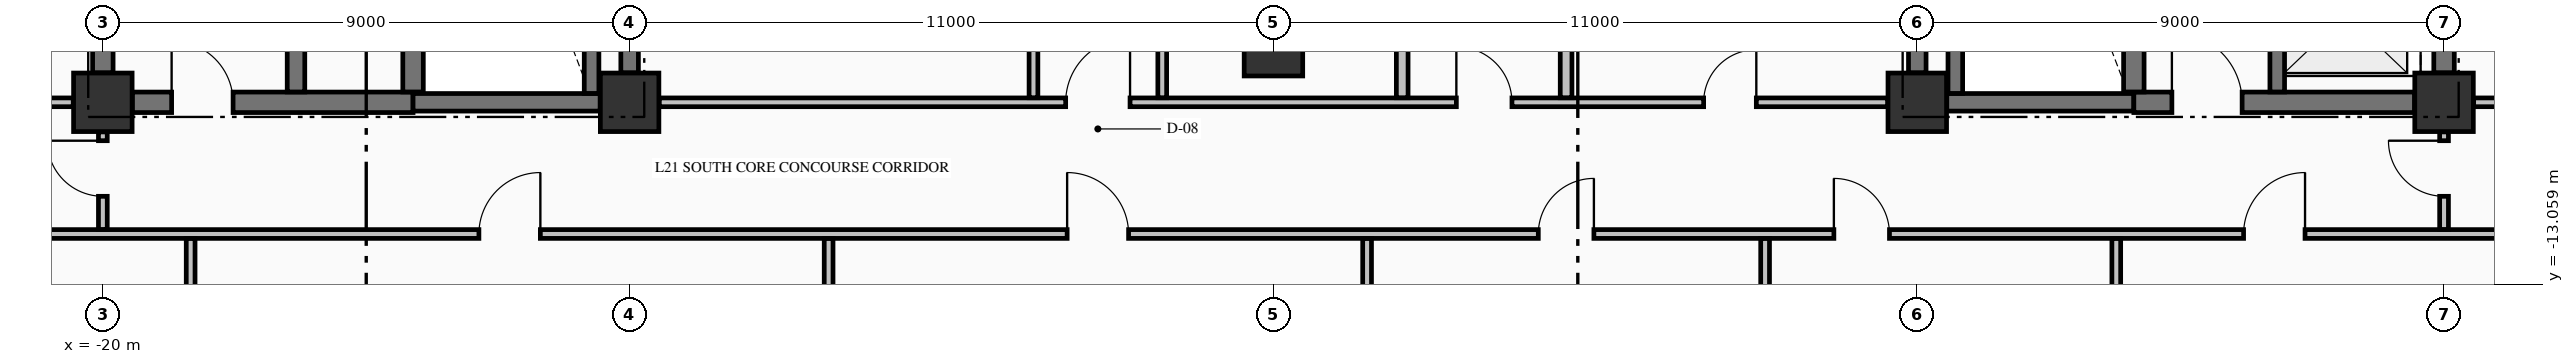
"""IFC4 building model, lengths in metres.
Left out: names, types, materials, properties, quantities, classifications, styles, units other than length and angle.
Written with IfcOpenShell. Run it as: python <this file> out.ifc"""

import sys

from ifc_helpers import new_model, si_unit, direction, frame, frame_2d, origin, origin_2d, place, context, subcontext, project, spatial, rectangle, extrude, element, fill, save


model = new_model("IFC4")
c1 = context("Model", 3, precision=1e-05, world=origin(), true_north=direction((0.0, 1.0)))
c2 = subcontext(c1, "Body", "Model", "MODEL_VIEW")
j1 = project(units=[si_unit("LENGTHUNIT", "METRE"), si_unit("PLANEANGLEUNIT", "RADIAN")], contexts=[c1])
p1 = place(None, origin())
s1 = spatial("IfcSite", under=j1, at=p1, CompositionType="ELEMENT")
p2 = place(p1, origin())
s2 = spatial("IfcBuilding", under=s1, at=p2, CompositionType="ELEMENT")
p3 = place(p2, frame((0.0, 0.0, 86.94)))
s3 = spatial("IfcBuildingStorey", under=s2, at=p3, CompositionType="ELEMENT", Elevation=86.94)
for number, where, z_axis, x_axis in (
    (1, (-20.0, -9.95, -0.425), (0.0, 0.0, 1.0), (1.0, 0.0, 0.0)),
    (2, (-11.0, -9.95, -0.425), (0.0, 0.0, 1.0), (1.0, 0.0, 0.0)),
    (3, (11.0, -9.95, -0.425), (0.0, 0.0, 1.0), (1.0, 0.0, 0.0)),
    (4, (20.0, -9.95, -0.425), (0.0, 0.0, 1.0), (1.0, 0.0, 0.0)),
    (5, (0.0, -9.0, -0.425), (0.0, 0.0, 1.0), (1.0, 0.0, 0.0)),
):
    element("IfcColumn", number, at=place(p3, frame(where, z_axis=z_axis, x_axis=x_axis)), inside=s3, PredefinedType="COLUMN", context=c2, shape_type="SweptSolid", body=[
        extrude(rectangle(XDim=1.0, YDim=1.0, at=origin_2d()), origin(), (0.0, 0.0, 1.0), 4.595),
    ])
p4 = place(p3, frame((-19.496, -9.95, 0.0), z_axis=(0.0, 0.0, 1.0), x_axis=(1.0, 0.0, 0.0)))
e6 = element("IfcWall", 6, at=p4, inside=s3, PredefinedType="SHEAR", context=c2, shape_type="SweptSolid", body=[
    extrude(rectangle(XDim=4.796, YDim=0.35, at=frame_2d((2.398, 0.0))), origin(), (0.0, 0.0, 1.0), 4.17),
])
p5 = place(p4, frame((0.671, 0.0, 0.0)))
e7 = element("IfcOpeningElement", 7, at=p5, cuts=e6, PredefinedType="OPENING", context=c2, shape_type="SweptSolid", body=[
    extrude(rectangle(XDim=1.05, YDim=2.15, at=frame_2d((0.525, 1.075))), frame((0.0, 0.185, 0.0), z_axis=(0.0, -1.0, 0.0), x_axis=(1.0, 0.0, 0.0)), (0.0, 0.0, 1.0), 0.37),
])
for number, where, z_axis, x_axis in (
    (8, (-14.7, -9.95, 0.0), (0.0, 0.0, 1.0), (1.0, 0.0, 0.0)),
    (9, (11.504, -9.95, 0.0), (0.0, 0.0, 1.0), (1.0, 0.0, 0.0)),
):
    element("IfcWall", number, at=place(p3, frame(where, z_axis=z_axis, x_axis=x_axis)), inside=s3, PredefinedType="SHEAR", context=c2, shape_type="SweptSolid", body=[
        extrude(rectangle(XDim=3.196, YDim=0.3, at=frame_2d((1.598, 0.0))), origin(), (0.0, 0.0, 1.0), 4.17),
    ])
p6 = place(p3, frame((14.7, -9.95, 0.0), z_axis=(0.0, 0.0, 1.0), x_axis=(1.0, 0.0, 0.0)))
e10 = element("IfcWall", 10, at=p6, inside=s3, PredefinedType="SHEAR", context=c2, shape_type="SweptSolid", body=[
    extrude(rectangle(XDim=4.796, YDim=0.35, at=frame_2d((2.398, 0.0))), origin(), (0.0, 0.0, 1.0), 4.17),
])
p7 = place(p6, frame((0.65, 0.0, 0.0)))
e11 = element("IfcOpeningElement", 11, at=p7, cuts=e10, PredefinedType="OPENING", context=c2, shape_type="SweptSolid", body=[
    extrude(rectangle(XDim=1.2, YDim=2.15, at=frame_2d((0.6, 1.075))), frame((0.0, 0.185, 0.0), z_axis=(0.0, -1.0, 0.0), x_axis=(1.0, 0.0, 0.0)), (0.0, 0.0, 1.0), 0.37),
])
p8 = place(p3, frame((-22.835, -12.2, 0.0), z_axis=(0.0, 0.0, 1.0), x_axis=(1.0, 0.0, 0.0)))
e12 = element("IfcWall", 12, at=p8, inside=s3, PredefinedType="PARTITIONING", context=c2, shape_type="SweptSolid", body=[
    extrude(rectangle(XDim=50.67, YDim=0.15, at=frame_2d((25.335, 0.0))), origin(), (0.0, 0.0, 1.0), 4.17),
])
p9 = place(p8, frame((9.26, 0.0, 0.0)))
e13 = element("IfcOpeningElement", 13, at=p9, cuts=e12, PredefinedType="OPENING", context=c2, shape_type="SweptSolid", body=[
    extrude(rectangle(XDim=1.05, YDim=2.15, at=frame_2d((0.525, 1.075))), frame((0.0, 0.085, 0.0), z_axis=(0.0, -1.0, 0.0), x_axis=(1.0, 0.0, 0.0)), (0.0, 0.0, 1.0), 0.17),
])
p10 = place(p8, frame((19.31, 0.0, 0.0)))
e14 = element("IfcOpeningElement", 14, at=p10, cuts=e12, PredefinedType="OPENING", context=c2, shape_type="SweptSolid", body=[
    extrude(rectangle(XDim=1.05, YDim=2.15, at=frame_2d((0.525, 1.075))), frame((0.0, 0.085, 0.0), z_axis=(0.0, -1.0, 0.0), x_axis=(1.0, 0.0, 0.0)), (0.0, 0.0, 1.0), 0.17),
])
p11 = place(p8, frame((27.36, 0.0, 0.0)))
e15 = element("IfcOpeningElement", 15, at=p11, cuts=e12, PredefinedType="OPENING", context=c2, shape_type="SweptSolid", body=[
    extrude(rectangle(XDim=0.95, YDim=2.15, at=frame_2d((0.475, 1.075))), frame((0.0, 0.085, 0.0), z_axis=(0.0, -1.0, 0.0), x_axis=(1.0, 0.0, 0.0)), (0.0, 0.0, 1.0), 0.17),
])
p12 = place(p8, frame((32.41, 0.0, 0.0)))
e16 = element("IfcOpeningElement", 16, at=p12, cuts=e12, PredefinedType="OPENING", context=c2, shape_type="SweptSolid", body=[
    extrude(rectangle(XDim=0.95, YDim=2.15, at=frame_2d((0.475, 1.075))), frame((0.0, 0.085, 0.0), z_axis=(0.0, -1.0, 0.0), x_axis=(1.0, 0.0, 0.0)), (0.0, 0.0, 1.0), 0.17),
])
p13 = place(p8, frame((39.41, 0.0, 0.0)))
e17 = element("IfcOpeningElement", 17, at=p13, cuts=e12, PredefinedType="OPENING", context=c2, shape_type="SweptSolid", body=[
    extrude(rectangle(XDim=1.05, YDim=2.15, at=frame_2d((0.525, 1.075))), frame((0.0, 0.085, 0.0), z_axis=(0.0, -1.0, 0.0), x_axis=(1.0, 0.0, 0.0)), (0.0, 0.0, 1.0), 0.17),
])
p14 = place(p3, frame((-22.835, -9.95, 0.0), z_axis=(0.0, 0.0, 1.0), x_axis=(1.0, 0.0, 0.0)))
e18 = element("IfcWall", 18, at=p14, inside=s3, PredefinedType="PARTITIONING", context=c2, shape_type="SweptSolid", body=[
    extrude(rectangle(XDim=2.329, YDim=0.15, at=frame_2d((1.165, 0.0))), origin(), (0.0, 0.0, 1.0), 4.17),
])
p15 = place(p14, frame((0.835, 0.0, 0.0)))
e19 = element("IfcOpeningElement", 19, at=p15, cuts=e18, PredefinedType="OPENING", context=c2, shape_type="SweptSolid", body=[
    extrude(rectangle(XDim=1.0, YDim=2.15, at=frame_2d((0.5, 1.075))), frame((0.0, 0.085, 0.0), z_axis=(0.0, -1.0, 0.0), x_axis=(1.0, 0.0, 0.0)), (0.0, 0.0, 1.0), 0.17),
])
p16 = place(p3, frame((-10.494, -9.95, 0.0), z_axis=(0.0, 0.0, 1.0), x_axis=(1.0, 0.0, 0.0)))
e20 = element("IfcWall", 20, at=p16, inside=s3, PredefinedType="PARTITIONING", context=c2, shape_type="SweptSolid", body=[
    extrude(rectangle(XDim=20.988, YDim=0.15, at=frame_2d((10.494, 0.0))), origin(), (0.0, 0.0, 1.0), 4.17),
])
p17 = place(p16, frame((6.944, 0.0, 0.0)))
e21 = element("IfcOpeningElement", 21, at=p17, cuts=e20, PredefinedType="OPENING", context=c2, shape_type="SweptSolid", body=[
    extrude(rectangle(XDim=1.1, YDim=2.15, at=frame_2d((0.55, 1.075))), frame((0.0, 0.085, 0.0), z_axis=(0.0, -1.0, 0.0), x_axis=(1.0, 0.0, 0.0)), (0.0, 0.0, 1.0), 0.17),
])
p18 = place(p16, frame((13.619, 0.0, 0.0)))
e22 = element("IfcOpeningElement", 22, at=p18, cuts=e20, PredefinedType="OPENING", context=c2, shape_type="SweptSolid", body=[
    extrude(rectangle(XDim=0.95, YDim=2.15, at=frame_2d((0.475, 1.075))), frame((0.0, 0.085, 0.0), z_axis=(0.0, -1.0, 0.0), x_axis=(1.0, 0.0, 0.0)), (0.0, 0.0, 1.0), 0.17),
])
p19 = place(p16, frame((17.844, 0.0, 0.0)))
e23 = element("IfcOpeningElement", 23, at=p19, cuts=e20, PredefinedType="OPENING", context=c2, shape_type="SweptSolid", body=[
    extrude(rectangle(XDim=0.9, YDim=2.15, at=frame_2d((0.45, 1.075))), frame((0.0, 0.085, 0.0), z_axis=(0.0, -1.0, 0.0), x_axis=(1.0, 0.0, 0.0)), (0.0, 0.0, 1.0), 0.17),
])
p20 = place(p3, frame((20.506, -9.95, 0.0), z_axis=(0.0, 0.0, 1.0), x_axis=(1.0, 0.0, 0.0)))
e24 = element("IfcWall", 24, at=p20, inside=s3, PredefinedType="PARTITIONING", context=c2, shape_type="SweptSolid", body=[
    extrude(rectangle(XDim=7.329, YDim=0.15, at=frame_2d((3.665, 0.0))), origin(), (0.0, 0.0, 1.0), 4.17),
])
p21 = place(p20, frame((3.019, 0.0, 0.0)))
e25 = element("IfcOpeningElement", 25, at=p21, cuts=e24, PredefinedType="OPENING", context=c2, shape_type="SweptSolid", body=[
    extrude(rectangle(XDim=0.95, YDim=2.15, at=frame_2d((0.475, 1.075))), frame((0.0, 0.085, 0.0), z_axis=(0.0, -1.0, 0.0), x_axis=(1.0, 0.0, 0.0)), (0.0, 0.0, 1.0), 0.17),
])
p22 = place(p3, frame((-20.0, -9.446, 0.0), z_axis=(0.0, 0.0, 1.0), x_axis=(0.0, 1.0, 0.0)))
e26 = element("IfcWall", 26, at=p22, inside=s3, PredefinedType="SHEAR", context=c2, shape_type="SweptSolid", body=[
    extrude(rectangle(XDim=8.942, YDim=0.35, at=frame_2d((4.471, 0.0))), origin(), (0.0, 0.0, 1.0), 4.17),
])
p23 = place(p3, frame((-16.7, -9.773, 0.0), z_axis=(0.0, 0.0, 1.0), x_axis=(0.0, 1.0, 0.0)))
e27 = element("IfcWall", 27, at=p23, inside=s3, PredefinedType="SHEAR", context=c2, shape_type="SweptSolid", body=[
    extrude(rectangle(XDim=9.371, YDim=0.3, at=frame_2d((4.686, 0.0))), origin(), (0.0, 0.0, 1.0), 4.17),
])
p24 = place(p3, frame((-14.7, -9.773, 0.0), z_axis=(0.0, 0.0, 1.0), x_axis=(0.0, 1.0, 0.0)))
e28 = element("IfcWall", 28, at=p24, inside=s3, PredefinedType="SHEAR", context=c2, shape_type="SweptSolid", body=[
    extrude(rectangle(XDim=9.371, YDim=0.35, at=frame_2d((4.686, 0.0))), origin(), (0.0, 0.0, 1.0), 4.17),
])
p25 = place(p3, frame((-11.65, -9.798, 0.0), z_axis=(0.0, 0.0, 1.0), x_axis=(0.0, 1.0, 0.0)))
e29 = element("IfcWall", 29, at=p25, inside=s3, PredefinedType="SOLIDWALL", context=c2, shape_type="SweptSolid", body=[
    extrude(rectangle(XDim=9.396, YDim=0.25, at=frame_2d((4.698, 0.0))), origin(), (0.0, 0.0, 1.0), 4.17),
])
for number, where, z_axis, x_axis in (
    (30, (-11.0, -9.446, 0.0), (0.0, 0.0, 1.0), (0.0, 1.0, 0.0)),
    (31, (11.0, -9.446, 0.0), (0.0, 0.0, 1.0), (0.0, 1.0, 0.0)),
):
    element("IfcWall", number, at=place(p3, frame(where, z_axis=z_axis, x_axis=x_axis)), inside=s3, PredefinedType="SHEAR", context=c2, shape_type="SweptSolid", body=[
        extrude(rectangle(XDim=8.942, YDim=0.3, at=frame_2d((4.471, 0.0))), origin(), (0.0, 0.0, 1.0), 4.17),
    ])
p26 = place(p3, frame((11.65, -9.798, 0.0), z_axis=(0.0, 0.0, 1.0), x_axis=(0.0, 1.0, 0.0)))
e32 = element("IfcWall", 32, at=p26, inside=s3, PredefinedType="SOLIDWALL", context=c2, shape_type="SweptSolid", body=[
    extrude(rectangle(XDim=9.396, YDim=0.25, at=frame_2d((4.698, 0.0))), origin(), (0.0, 0.0, 1.0), 4.17),
])
p27 = place(p3, frame((14.7, -9.773, 0.0), z_axis=(0.0, 0.0, 1.0), x_axis=(0.0, 1.0, 0.0)))
e33 = element("IfcWall", 33, at=p27, inside=s3, PredefinedType="SHEAR", context=c2, shape_type="SweptSolid", body=[
    extrude(rectangle(XDim=9.371, YDim=0.35, at=frame_2d((4.686, 0.0))), origin(), (0.0, 0.0, 1.0), 4.17),
])
p28 = place(p3, frame((17.15, -9.773, 0.0), z_axis=(0.0, 0.0, 1.0), x_axis=(0.0, 1.0, 0.0)))
e34 = element("IfcWall", 34, at=p28, inside=s3, PredefinedType="SOLIDWALL", context=c2, shape_type="SweptSolid", body=[
    extrude(rectangle(XDim=2.596, YDim=0.25, at=frame_2d((1.298, 0.0))), origin(), (0.0, 0.0, 1.0), 4.17),
])
p29 = place(p28, frame((0.723, 0.0, 0.0)))
e35 = element("IfcOpeningElement", 35, at=p29, cuts=e34, PredefinedType="OPENING", context=c2, shape_type="SweptSolid", body=[
    extrude(rectangle(XDim=1.1, YDim=2.2, at=frame_2d((0.55, 1.1))), frame((0.0, 0.135, 0.0), z_axis=(0.0, -1.0, 0.0), x_axis=(1.0, 0.0, 0.0)), (0.0, 0.0, 1.0), 0.27),
])
p30 = place(p3, frame((20.0, -9.446, 0.0), z_axis=(0.0, 0.0, 1.0), x_axis=(0.0, 1.0, 0.0)))
e36 = element("IfcWall", 36, at=p30, inside=s3, PredefinedType="SHEAR", context=c2, shape_type="SweptSolid", body=[
    extrude(rectangle(XDim=2.269, YDim=0.35, at=frame_2d((1.135, 0.0))), origin(), (0.0, 0.0, 1.0), 4.17),
])
p31 = place(p3, frame((-20.0, -12.122, 0.0), z_axis=(0.0, 0.0, 1.0), x_axis=(0.0, 1.0, 0.0)))
e37 = element("IfcWall", 37, at=p31, inside=s3, PredefinedType="PARTITIONING", context=c2, shape_type="SweptSolid", body=[
    extrude(rectangle(XDim=1.666, YDim=0.15, at=frame_2d((0.833, 0.0))), origin(), (0.0, 0.0, 1.0), 3.36),
])
p32 = place(p31, frame((0.566, 0.0, 0.0)))
e38 = element("IfcOpeningElement", 38, at=p32, cuts=e37, PredefinedType="OPENING", context=c2, shape_type="SweptSolid", body=[
    extrude(rectangle(XDim=0.95, YDim=2.15, at=frame_2d((0.475, 1.075))), frame((0.0, 0.085, 0.0), z_axis=(0.0, -1.0, 0.0), x_axis=(1.0, 0.0, 0.0)), (0.0, 0.0, 1.0), 0.17),
])
p33 = place(p3, frame((-18.5, -20.394, 0.0), z_axis=(0.0, 0.0, 1.0), x_axis=(0.0, 1.0, 0.0)))
e39 = element("IfcWall", 39, at=p33, inside=s3, PredefinedType="PARTITIONING", context=c2, shape_type="SweptSolid", body=[
    extrude(rectangle(XDim=8.116, YDim=0.15, at=frame_2d((4.058, 0.0))), origin(), (0.0, 0.0, 1.0), 4.17),
])
p34 = place(p3, frame((-7.6, -25.335, 0.0), z_axis=(0.0, 0.0, 1.0), x_axis=(0.0, 1.0, 0.0)))
e40 = element("IfcWall", 40, at=p34, inside=s3, PredefinedType="PARTITIONING", context=c2, shape_type="SweptSolid", body=[
    extrude(rectangle(XDim=13.057, YDim=0.15, at=frame_2d((6.528, 0.0))), origin(), (0.0, 0.0, 1.0), 4.17),
])
p35 = place(p3, frame((-4.1, -9.872, 0.0), z_axis=(0.0, 0.0, 1.0), x_axis=(0.0, 1.0, 0.0)))
e41 = element("IfcWall", 41, at=p35, inside=s3, PredefinedType="PARTITIONING", context=c2, shape_type="SweptSolid", body=[
    extrude(rectangle(XDim=9.544, YDim=0.15, at=frame_2d((4.772, 0.0))), origin(), (0.0, 0.0, 1.0), 4.17),
])
p36 = place(p3, frame((-1.9, -9.872, 0.0), z_axis=(0.0, 0.0, 1.0), x_axis=(0.0, 1.0, 0.0)))
e42 = element("IfcWall", 42, at=p36, inside=s3, PredefinedType="PARTITIONING", context=c2, shape_type="SweptSolid", body=[
    extrude(rectangle(XDim=4.919, YDim=0.15, at=frame_2d((2.459, 0.0))), origin(), (0.0, 0.0, 1.0), 4.17),
])
p37 = place(p36, frame((2.597, 0.0, 0.0)))
e43 = element("IfcOpeningElement", 43, at=p37, cuts=e42, PredefinedType="OPENING", context=c2, shape_type="SweptSolid", body=[
    extrude(rectangle(XDim=0.95, YDim=2.15, at=frame_2d((0.475, 1.075))), frame((0.0, 0.085, 0.0), z_axis=(0.0, -1.0, 0.0), x_axis=(1.0, 0.0, 0.0)), (0.0, 0.0, 1.0), 0.17),
])
p38 = place(p3, frame((1.6, -25.335, 0.0), z_axis=(0.0, 0.0, 1.0), x_axis=(0.0, 1.0, 0.0)))
e44 = element("IfcWall", 44, at=p38, inside=s3, PredefinedType="PARTITIONING", context=c2, shape_type="SweptSolid", body=[
    extrude(rectangle(XDim=13.057, YDim=0.15, at=frame_2d((6.528, 0.0))), origin(), (0.0, 0.0, 1.0), 4.17),
])
for number, where, z_axis, x_axis in (
    (45, (2.2, -9.872, 0.0), (0.0, 0.0, 1.0), (0.0, 1.0, 0.0)),
    (46, (5.0, -9.872, 0.0), (0.0, 0.0, 1.0), (0.0, 1.0, 0.0)),
):
    element("IfcWall", number, at=place(p3, frame(where, z_axis=z_axis, x_axis=x_axis)), inside=s3, PredefinedType="PARTITIONING", context=c2, shape_type="SweptSolid", body=[
        extrude(rectangle(XDim=4.919, YDim=0.2, at=frame_2d((2.459, 0.0))), origin(), (0.0, 0.0, 1.0), 4.17),
    ])
for number, where, z_axis, x_axis in (
    (47, (8.4, -25.335, 0.0), (0.0, 0.0, 1.0), (0.0, 1.0, 0.0)),
    (48, (14.4, -25.335, 0.0), (0.0, 0.0, 1.0), (0.0, 1.0, 0.0)),
):
    element("IfcWall", number, at=place(p3, frame(where, z_axis=z_axis, x_axis=x_axis)), inside=s3, PredefinedType="PARTITIONING", context=c2, shape_type="SweptSolid", body=[
        extrude(rectangle(XDim=13.057, YDim=0.15, at=frame_2d((6.528, 0.0))), origin(), (0.0, 0.0, 1.0), 4.17),
    ])
p39 = place(p3, frame((20.0, -12.122, 0.0), z_axis=(0.0, 0.0, 1.0), x_axis=(0.0, 1.0, 0.0)))
e49 = element("IfcWall", 49, at=p39, inside=s3, PredefinedType="PARTITIONING", context=c2, shape_type="SweptSolid", body=[
    extrude(rectangle(XDim=1.666, YDim=0.15, at=frame_2d((0.833, 0.0))), origin(), (0.0, 0.0, 1.0), 3.36),
])
p40 = place(p39, frame((0.566, 0.0, 0.0)))
e50 = element("IfcOpeningElement", 50, at=p40, cuts=e49, PredefinedType="OPENING", context=c2, shape_type="SweptSolid", body=[
    extrude(rectangle(XDim=0.95, YDim=2.15, at=frame_2d((0.475, 1.075))), frame((0.0, 0.085, 0.0), z_axis=(0.0, -1.0, 0.0), x_axis=(1.0, 0.0, 0.0)), (0.0, 0.0, 1.0), 0.17),
])
p41 = place(p5, origin())
e51 = element("IfcDoor", 51, at=p41, inside=s3, OperationType="SINGLE_SWING_LEFT", PredefinedType="DOOR", context=c2, shape_type="SweptSolid", body=[
    extrude(rectangle(XDim=1.05, YDim=2.15, at=frame_2d((0.525, 1.075))), frame((0.0, 0.025, 0.0), z_axis=(0.0, -1.0, 0.0), x_axis=(1.0, 0.0, 0.0)), (0.0, 0.0, 1.0), 0.05),
])
fill(e7, e51)
p42 = place(p7, origin())
e52 = element("IfcDoor", 52, at=p42, inside=s3, OperationType="SINGLE_SWING_LEFT", PredefinedType="DOOR", context=c2, shape_type="SweptSolid", body=[
    extrude(rectangle(XDim=1.2, YDim=2.15, at=frame_2d((0.6, 1.075))), frame((0.0, 0.025, 0.0), z_axis=(0.0, -1.0, 0.0), x_axis=(1.0, 0.0, 0.0)), (0.0, 0.0, 1.0), 0.05),
])
fill(e11, e52)
p43 = place(p17, origin())
e53 = element("IfcDoor", 53, at=p43, inside=s3, OperationType="SINGLE_SWING_RIGHT", PredefinedType="DOOR", context=c2, shape_type="SweptSolid", body=[
    extrude(rectangle(XDim=1.1, YDim=2.15, at=frame_2d((0.55, 1.075))), frame((0.0, 0.025, 0.0), z_axis=(0.0, -1.0, 0.0), x_axis=(1.0, 0.0, 0.0)), (0.0, 0.0, 1.0), 0.05),
])
fill(e21, e53)
p44 = place(p9, origin())
e54 = element("IfcDoor", 54, at=p44, inside=s3, OperationType="SINGLE_SWING_RIGHT", PredefinedType="DOOR", context=c2, shape_type="SweptSolid", body=[
    extrude(rectangle(XDim=1.05, YDim=2.15, at=frame_2d((0.525, 1.075))), frame((0.0, 0.025, 0.0), z_axis=(0.0, -1.0, 0.0), x_axis=(1.0, 0.0, 0.0)), (0.0, 0.0, 1.0), 0.05),
])
fill(e13, e54)
p45 = place(p10, origin())
e55 = element("IfcDoor", 55, at=p45, inside=s3, OperationType="SINGLE_SWING_LEFT", PredefinedType="DOOR", context=c2, shape_type="SweptSolid", body=[
    extrude(rectangle(XDim=1.05, YDim=2.15, at=frame_2d((0.525, 1.075))), frame((0.0, 0.025, 0.0), z_axis=(0.0, -1.0, 0.0), x_axis=(1.0, 0.0, 0.0)), (0.0, 0.0, 1.0), 0.05),
])
fill(e14, e55)
p46 = place(p11, origin())
e56 = element("IfcDoor", 56, at=p46, inside=s3, OperationType="SINGLE_SWING_RIGHT", PredefinedType="DOOR", context=c2, shape_type="SweptSolid", body=[
    extrude(rectangle(XDim=0.95, YDim=2.15, at=frame_2d((0.475, 1.075))), frame((0.0, 0.025, 0.0), z_axis=(0.0, -1.0, 0.0), x_axis=(1.0, 0.0, 0.0)), (0.0, 0.0, 1.0), 0.05),
])
fill(e15, e56)
p47 = place(p12, origin())
e57 = element("IfcDoor", 57, at=p47, inside=s3, OperationType="SINGLE_SWING_LEFT", PredefinedType="DOOR", context=c2, shape_type="SweptSolid", body=[
    extrude(rectangle(XDim=0.95, YDim=2.15, at=frame_2d((0.475, 1.075))), frame((0.0, 0.025, 0.0), z_axis=(0.0, -1.0, 0.0), x_axis=(1.0, 0.0, 0.0)), (0.0, 0.0, 1.0), 0.05),
])
fill(e16, e57)
p48 = place(p13, origin())
e58 = element("IfcDoor", 58, at=p48, inside=s3, OperationType="SINGLE_SWING_RIGHT", PredefinedType="DOOR", context=c2, shape_type="SweptSolid", body=[
    extrude(rectangle(XDim=1.05, YDim=2.15, at=frame_2d((0.525, 1.075))), frame((0.0, 0.025, 0.0), z_axis=(0.0, -1.0, 0.0), x_axis=(1.0, 0.0, 0.0)), (0.0, 0.0, 1.0), 0.05),
])
fill(e17, e58)
p49 = place(p18, origin())
e59 = element("IfcDoor", 59, at=p49, inside=s3, OperationType="SINGLE_SWING_LEFT", PredefinedType="DOOR", context=c2, shape_type="SweptSolid", body=[
    extrude(rectangle(XDim=0.95, YDim=2.15, at=frame_2d((0.475, 1.075))), frame((0.0, 0.025, 0.0), z_axis=(0.0, -1.0, 0.0), x_axis=(1.0, 0.0, 0.0)), (0.0, 0.0, 1.0), 0.05),
])
fill(e22, e59)
p50 = place(p19, origin())
e60 = element("IfcDoor", 60, at=p50, inside=s3, OperationType="SINGLE_SWING_RIGHT", PredefinedType="DOOR", context=c2, shape_type="SweptSolid", body=[
    extrude(rectangle(XDim=0.9, YDim=2.15, at=frame_2d((0.45, 1.075))), frame((0.0, 0.025, 0.0), z_axis=(0.0, -1.0, 0.0), x_axis=(1.0, 0.0, 0.0)), (0.0, 0.0, 1.0), 0.05),
])
fill(e23, e60)
p51 = place(p32, origin())
e61 = element("IfcDoor", 61, at=p51, inside=s3, OperationType="SINGLE_SWING_RIGHT", PredefinedType="DOOR", context=c2, shape_type="SweptSolid", body=[
    extrude(rectangle(XDim=0.95, YDim=2.15, at=frame_2d((0.475, 1.075))), frame((0.0, 0.025, 0.0), z_axis=(0.0, -1.0, 0.0), x_axis=(1.0, 0.0, 0.0)), (0.0, 0.0, 1.0), 0.05),
])
fill(e38, e61)
p52 = place(p40, origin())
e62 = element("IfcDoor", 62, at=p52, inside=s3, OperationType="SINGLE_SWING_RIGHT", PredefinedType="DOOR", context=c2, shape_type="SweptSolid", body=[
    extrude(rectangle(XDim=0.95, YDim=2.15, at=frame_2d((0.475, 1.075))), frame((0.0, 0.025, 0.0), z_axis=(0.0, -1.0, 0.0), x_axis=(1.0, 0.0, 0.0)), (0.0, 0.0, 1.0), 0.05),
])
fill(e50, e62)
save(model, sys.argv[1])
